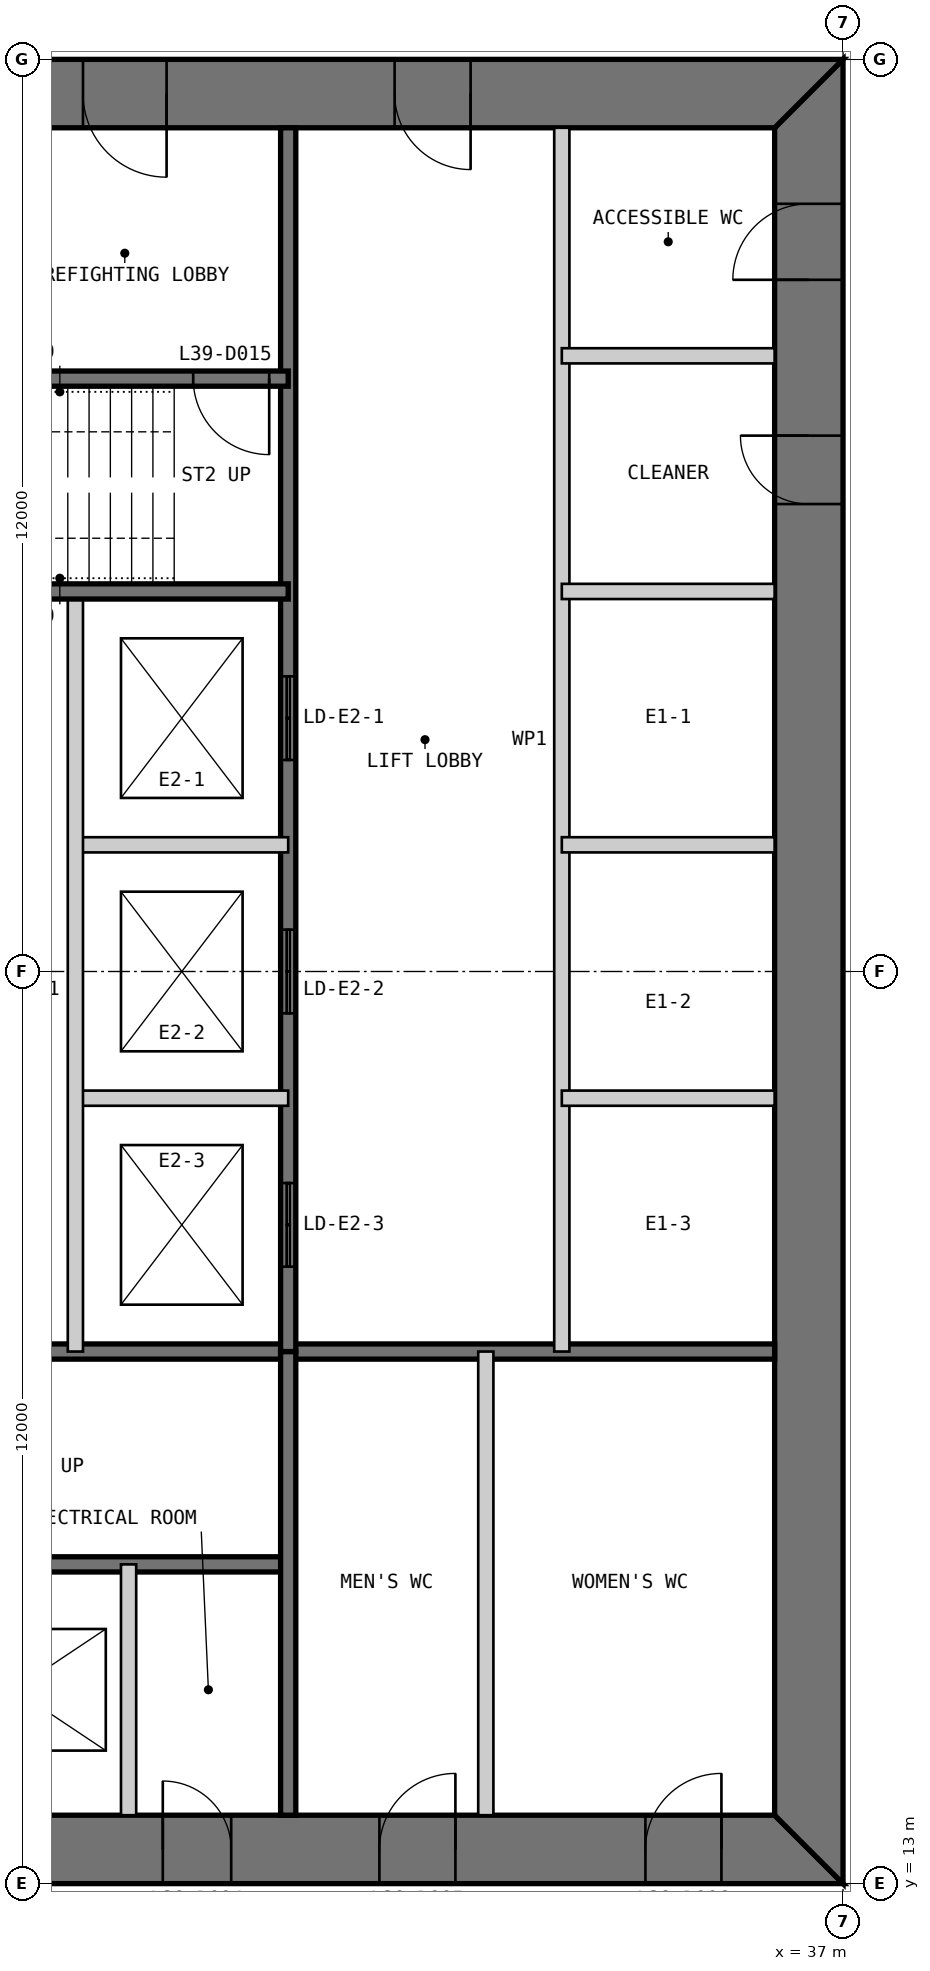
"""IFC4 building model, lengths in metres.
Left out: names, types, materials, properties, quantities, classifications, styles, units other than length and angle.
Written with IfcOpenShell. Run it as: python <this file> out.ifc"""

import sys

from ifc_helpers import new_model, si_unit, direction, frame, frame_2d, origin, place, context, subcontext, project, spatial, polyline, rectangle, outline, extrude, element, fill, save


model = new_model("IFC4")
c1 = context("Model", 3, precision=1e-05, world=origin(), true_north=direction((0.0, 1.0)))
c2 = subcontext(c1, "Body", "Model", "MODEL_VIEW")
j1 = project(units=[si_unit("LENGTHUNIT", "METRE"), si_unit("PLANEANGLEUNIT", "RADIAN")], contexts=[c1])
p1 = place(None, origin())
s1 = spatial("IfcSite", under=j1, at=p1, CompositionType="ELEMENT")
p2 = place(p1, origin())
s2 = spatial("IfcBuilding", under=s1, at=p2, CompositionType="ELEMENT")
p3 = place(p2, frame((0.0, 0.0, 168.4)))
s3 = spatial("IfcBuildingStorey", under=s2, at=p3, CompositionType="ELEMENT", Elevation=168.4)
p4 = place(p3, frame((13.0, 13.45, 0.0), z_axis=(0.0, 0.0, 1.0), x_axis=(1.0, 0.0, 0.0)))
e1 = element("IfcWall", 1, at=p4, inside=s3, PredefinedType="SHEAR", context=c2, shape_type="SweptSolid", body=[
    extrude(outline(polyline([(0.0, -0.45), (24.0, -0.45), (23.1, 0.45), (0.9, 0.45), (0.0, -0.45)])), origin(), (0.0, 0.0, 1.0), 5.4),
])
p5 = place(p4, frame((4.9, 0.0, 0.0)))
e2 = element("IfcOpeningElement", 2, at=p5, cuts=e1, PredefinedType="OPENING", context=c2, shape_type="SweptSolid", body=[
    extrude(rectangle(XDim=1.0, YDim=2.2, at=frame_2d((0.5, 1.1))), frame((0.0, 0.46, 0.0), z_axis=(0.0, -1.0, 0.0), x_axis=(1.0, 0.0, 0.0)), (0.0, 0.0, 1.0), 0.92),
])
p6 = place(p4, frame((8.9, 0.0, 0.0)))
e3 = element("IfcOpeningElement", 3, at=p6, cuts=e1, PredefinedType="OPENING", context=c2, shape_type="SweptSolid", body=[
    extrude(rectangle(XDim=1.1, YDim=2.2, at=frame_2d((0.55, 1.1))), frame((0.0, 0.46, 0.0), z_axis=(0.0, -1.0, 0.0), x_axis=(1.0, 0.0, 0.0)), (0.0, 0.0, 1.0), 0.92),
])
p7 = place(p4, frame((15.05, 0.0, 0.0)))
e4 = element("IfcOpeningElement", 4, at=p7, cuts=e1, PredefinedType="OPENING", context=c2, shape_type="SweptSolid", body=[
    extrude(rectangle(XDim=0.9, YDim=2.2, at=frame_2d((0.45, 1.1))), frame((0.0, 0.46, 0.0), z_axis=(0.0, -1.0, 0.0), x_axis=(1.0, 0.0, 0.0)), (0.0, 0.0, 1.0), 0.92),
])
p8 = place(p4, frame((17.9, 0.0, 0.0)))
e5 = element("IfcOpeningElement", 5, at=p8, cuts=e1, PredefinedType="OPENING", context=c2, shape_type="SweptSolid", body=[
    extrude(rectangle(XDim=1.0, YDim=2.2, at=frame_2d((0.5, 1.1))), frame((0.0, 0.46, 0.0), z_axis=(0.0, -1.0, 0.0), x_axis=(1.0, 0.0, 0.0)), (0.0, 0.0, 1.0), 0.92),
])
p9 = place(p4, frame((21.4, 0.0, 0.0)))
e6 = element("IfcOpeningElement", 6, at=p9, cuts=e1, PredefinedType="OPENING", context=c2, shape_type="SweptSolid", body=[
    extrude(rectangle(XDim=1.0, YDim=2.2, at=frame_2d((0.5, 1.1))), frame((0.0, 0.46, 0.0), z_axis=(0.0, -1.0, 0.0), x_axis=(1.0, 0.0, 0.0)), (0.0, 0.0, 1.0), 0.92),
])
p10 = place(p3, frame((36.55, 13.9, 0.0), z_axis=(0.0, 0.0, 1.0), x_axis=(0.0, 1.0, 0.0)))
e7 = element("IfcWall", 7, at=p10, inside=s3, PredefinedType="SHEAR", context=c2, shape_type="SweptSolid", body=[
    extrude(outline(polyline([(-0.9, -0.45), (23.1, -0.45), (22.2, 0.45), (0.0, 0.45), (-0.9, -0.45)])), origin(), (0.0, 0.0, 1.0), 5.4),
])
p11 = place(p10, frame((20.2, 0.0, 0.0)))
e8 = element("IfcOpeningElement", 8, at=p11, cuts=e7, PredefinedType="OPENING", context=c2, shape_type="SweptSolid", body=[
    extrude(rectangle(XDim=1.0, YDim=2.2, at=frame_2d((0.5, 1.1))), frame((0.0, 0.46, 0.0), z_axis=(0.0, -1.0, 0.0), x_axis=(1.0, 0.0, 0.0)), (0.0, 0.0, 1.0), 0.92),
])
p12 = place(p10, frame((17.25, 0.0, 0.0)))
e9 = element("IfcOpeningElement", 9, at=p12, cuts=e7, PredefinedType="OPENING", context=c2, shape_type="SweptSolid", body=[
    extrude(rectangle(XDim=0.9, YDim=2.2, at=frame_2d((0.45, 1.1))), frame((0.0, 0.46, 0.0), z_axis=(0.0, -1.0, 0.0), x_axis=(1.0, 0.0, 0.0)), (0.0, 0.0, 1.0), 0.92),
])
p13 = place(p3, frame((37.0, 36.55, 0.0), z_axis=(0.0, 0.0, 1.0), x_axis=(-1.0, 0.0, 0.0)))
e10 = element("IfcWall", 10, at=p13, inside=s3, PredefinedType="SHEAR", context=c2, shape_type="SweptSolid", body=[
    extrude(outline(polyline([(0.0, -0.45), (24.0, -0.45), (23.1, 0.45), (0.9, 0.45), (0.0, -0.45)])), origin(), (0.0, 0.0, 1.0), 5.4),
])
p14 = place(p13, frame((4.9, 0.0, 0.0)))
e11 = element("IfcOpeningElement", 11, at=p14, cuts=e10, PredefinedType="OPENING", context=c2, shape_type="SweptSolid", body=[
    extrude(rectangle(XDim=1.0, YDim=2.2, at=frame_2d((0.5, 1.1))), frame((0.0, 0.46, 0.0), z_axis=(0.0, -1.0, 0.0), x_axis=(1.0, 0.0, 0.0)), (0.0, 0.0, 1.0), 0.92),
])
p15 = place(p13, frame((8.9, 0.0, 0.0)))
e12 = element("IfcOpeningElement", 12, at=p15, cuts=e10, PredefinedType="OPENING", context=c2, shape_type="SweptSolid", body=[
    extrude(rectangle(XDim=1.1, YDim=2.2, at=frame_2d((0.55, 1.1))), frame((0.0, 0.46, 0.0), z_axis=(0.0, -1.0, 0.0), x_axis=(1.0, 0.0, 0.0)), (0.0, 0.0, 1.0), 0.92),
])
p16 = place(p13, frame((15.05, 0.0, 0.0)))
e13 = element("IfcOpeningElement", 13, at=p16, cuts=e10, PredefinedType="OPENING", context=c2, shape_type="SweptSolid", body=[
    extrude(rectangle(XDim=0.9, YDim=2.2, at=frame_2d((0.45, 1.1))), frame((0.0, 0.46, 0.0), z_axis=(0.0, -1.0, 0.0), x_axis=(1.0, 0.0, 0.0)), (0.0, 0.0, 1.0), 0.92),
])
p17 = place(p13, frame((17.9, 0.0, 0.0)))
e14 = element("IfcOpeningElement", 14, at=p17, cuts=e10, PredefinedType="OPENING", context=c2, shape_type="SweptSolid", body=[
    extrude(rectangle(XDim=1.0, YDim=2.2, at=frame_2d((0.5, 1.1))), frame((0.0, 0.46, 0.0), z_axis=(0.0, -1.0, 0.0), x_axis=(1.0, 0.0, 0.0)), (0.0, 0.0, 1.0), 0.92),
])
p18 = place(p13, frame((21.4, 0.0, 0.0)))
e15 = element("IfcOpeningElement", 15, at=p18, cuts=e10, PredefinedType="OPENING", context=c2, shape_type="SweptSolid", body=[
    extrude(rectangle(XDim=1.0, YDim=2.2, at=frame_2d((0.5, 1.1))), frame((0.0, 0.46, 0.0), z_axis=(0.0, -1.0, 0.0), x_axis=(1.0, 0.0, 0.0)), (0.0, 0.0, 1.0), 0.92),
])
p19 = place(p3, frame((20.3, 17.2, 0.0), z_axis=(0.0, 0.0, 1.0), x_axis=(1.0, 0.0, 0.0)))
e16 = element("IfcWall", 16, at=p19, inside=s3, PredefinedType="SOLIDWALL", context=c2, shape_type="SweptSolid", body=[
    extrude(rectangle(XDim=9.4, YDim=0.2, at=frame_2d((4.7, 0.0))), origin(), (0.0, 0.0, 1.0), 5.2),
])
p20 = place(p19, frame((0.25, 0.0, 0.0)))
e17 = element("IfcOpeningElement", 17, at=p20, cuts=e16, PredefinedType="OPENING", context=c2, shape_type="SweptSolid", body=[
    extrude(rectangle(XDim=1.0, YDim=2.2, at=frame_2d((0.5, 1.1))), frame((0.0, 0.11, 0.0), z_axis=(0.0, -1.0, 0.0), x_axis=(1.0, 0.0, 0.0)), (0.0, 0.0, 1.0), 0.22),
])
p21 = place(p3, frame((20.3, 20.0, 0.0), z_axis=(0.0, 0.0, 1.0), x_axis=(1.0, 0.0, 0.0)))
e18 = element("IfcWall", 18, at=p21, inside=s3, PredefinedType="SOLIDWALL", context=c2, shape_type="SweptSolid", body=[
    extrude(rectangle(XDim=15.8, YDim=0.2, at=frame_2d((7.9, 0.0))), origin(), (0.0, 0.0, 1.0), 5.2),
])
p22 = place(p3, frame((27.6, 13.9, 0.0), z_axis=(0.0, 0.0, 1.0), x_axis=(0.0, 1.0, 0.0)))
e19 = element("IfcWall", 19, at=p22, inside=s3, PredefinedType="PARTITIONING", context=c2, shape_type="SweptSolid", body=[
    extrude(rectangle(XDim=3.3, YDim=0.2, at=frame_2d((1.65, 0.0))), origin(), (0.0, 0.0, 1.0), 5.2),
])
p23 = place(p3, frame((29.7, 13.9, 0.0), z_axis=(0.0, 0.0, 1.0), x_axis=(0.0, 1.0, 0.0)))
e20 = element("IfcWall", 20, at=p23, inside=s3, PredefinedType="SOLIDWALL", context=c2, shape_type="SweptSolid", body=[
    extrude(rectangle(XDim=6.1, YDim=0.2, at=frame_2d((3.05, 0.0))), origin(), (0.0, 0.0, 1.0), 5.2),
])
p24 = place(p3, frame((32.3, 13.9, 0.0), z_axis=(0.0, 0.0, 1.0), x_axis=(0.0, 1.0, 0.0)))
e21 = element("IfcWall", 21, at=p24, inside=s3, PredefinedType="PARTITIONING", context=c2, shape_type="SweptSolid", body=[
    extrude(rectangle(XDim=6.1, YDim=0.2, at=frame_2d((3.05, 0.0))), origin(), (0.0, 0.0, 1.0), 5.2),
])
p25 = place(p3, frame((33.3, 36.1, 0.0), z_axis=(0.0, 0.0, 1.0), x_axis=(0.0, -1.0, 0.0)))
e22 = element("IfcWall", 22, at=p25, inside=s3, PredefinedType="PARTITIONING", context=c2, shape_type="SweptSolid", body=[
    extrude(rectangle(XDim=16.1, YDim=0.2, at=frame_2d((8.05, 0.0))), origin(), (0.0, 0.0, 1.0), 5.2),
])
p26 = place(p3, frame((29.7, 36.1, 0.0), z_axis=(0.0, 0.0, 1.0), x_axis=(0.0, -1.0, 0.0)))
e23 = element("IfcWall", 23, at=p26, inside=s3, PredefinedType="SOLIDWALL", context=c2, shape_type="SweptSolid", body=[
    extrude(rectangle(XDim=16.1, YDim=0.2, at=frame_2d((8.05, 0.0))), origin(), (0.0, 0.0, 1.0), 5.2),
])
p27 = place(p26, frame((7.217, 0.0, 0.0)))
e24 = element("IfcOpeningElement", 24, at=p27, cuts=e23, PredefinedType="OPENING", context=c2, shape_type="SweptSolid", body=[
    extrude(rectangle(XDim=1.1, YDim=2.2, at=frame_2d((0.55, 1.1))), frame((0.0, 0.11, 0.0), z_axis=(0.0, -1.0, 0.0), x_axis=(1.0, 0.0, 0.0)), (0.0, 0.0, 1.0), 0.22),
])
p28 = place(p26, frame((10.55, 0.0, 0.0)))
e25 = element("IfcOpeningElement", 25, at=p28, cuts=e23, PredefinedType="OPENING", context=c2, shape_type="SweptSolid", body=[
    extrude(rectangle(XDim=1.1, YDim=2.2, at=frame_2d((0.55, 1.1))), frame((0.0, 0.11, 0.0), z_axis=(0.0, -1.0, 0.0), x_axis=(1.0, 0.0, 0.0)), (0.0, 0.0, 1.0), 0.22),
])
p29 = place(p26, frame((13.883, 0.0, 0.0)))
e26 = element("IfcOpeningElement", 26, at=p29, cuts=e23, PredefinedType="OPENING", context=c2, shape_type="SweptSolid", body=[
    extrude(rectangle(XDim=1.1, YDim=2.2, at=frame_2d((0.55, 1.1))), frame((0.0, 0.11, 0.0), z_axis=(0.0, -1.0, 0.0), x_axis=(1.0, 0.0, 0.0)), (0.0, 0.0, 1.0), 0.22),
])
for number, where, z_axis, x_axis in (
    (27, (36.1, 30.0, 0.0), (0.0, 0.0, 1.0), (-1.0, 0.0, 0.0)),
    (28, (36.1, 26.667, 0.0), (0.0, 0.0, 1.0), (-1.0, 0.0, 0.0)),
    (29, (36.1, 23.333, 0.0), (0.0, 0.0, 1.0), (-1.0, 0.0, 0.0)),
    (30, (29.7, 26.667, 0.0), (0.0, 0.0, 1.0), (-1.0, 0.0, 0.0)),
    (31, (29.7, 23.333, 0.0), (0.0, 0.0, 1.0), (-1.0, 0.0, 0.0)),
):
    element("IfcWall", number, at=place(p3, frame(where, z_axis=z_axis, x_axis=x_axis)), inside=s3, PredefinedType="PARTITIONING", context=c2, shape_type="SweptSolid", body=[
        extrude(rectangle(XDim=2.8, YDim=0.2, at=frame_2d((1.4, 0.0))), origin(), (0.0, 0.0, 1.0), 5.2),
    ])
p30 = place(p3, frame((26.9, 30.0, 0.0), z_axis=(0.0, 0.0, 1.0), x_axis=(0.0, -1.0, 0.0)))
e32 = element("IfcWall", 32, at=p30, inside=s3, PredefinedType="PARTITIONING", context=c2, shape_type="SweptSolid", body=[
    extrude(rectangle(XDim=10.0, YDim=0.2, at=frame_2d((5.0, 0.0))), origin(), (0.0, 0.0, 1.0), 5.2),
])
p31 = place(p3, frame((29.7, 32.8, 0.0), z_axis=(0.0, 0.0, 1.0), x_axis=(-1.0, 0.0, 0.0)))
e33 = element("IfcWall", 33, at=p31, inside=s3, PredefinedType="SOLIDWALL", context=c2, shape_type="SweptSolid", body=[
    extrude(rectangle(XDim=9.4, YDim=0.2, at=frame_2d((4.7, 0.0))), origin(), (0.0, 0.0, 1.0), 5.2),
])
p32 = place(p31, frame((0.25, 0.0, 0.0)))
e34 = element("IfcOpeningElement", 34, at=p32, cuts=e33, PredefinedType="OPENING", context=c2, shape_type="SweptSolid", body=[
    extrude(rectangle(XDim=1.0, YDim=2.2, at=frame_2d((0.5, 1.1))), frame((0.0, 0.11, 0.0), z_axis=(0.0, -1.0, 0.0), x_axis=(1.0, 0.0, 0.0)), (0.0, 0.0, 1.0), 0.22),
])
p33 = place(p3, frame((29.7, 30.0, 0.0), z_axis=(0.0, 0.0, 1.0), x_axis=(-1.0, 0.0, 0.0)))
e35 = element("IfcWall", 35, at=p33, inside=s3, PredefinedType="SOLIDWALL", context=c2, shape_type="SweptSolid", body=[
    extrude(rectangle(XDim=15.8, YDim=0.2, at=frame_2d((7.9, 0.0))), origin(), (0.0, 0.0, 1.0), 5.2),
])
p34 = place(p3, frame((36.1, 33.1, 0.0), z_axis=(0.0, 0.0, 1.0), x_axis=(-1.0, 0.0, 0.0)))
e36 = element("IfcWall", 36, at=p34, inside=s3, PredefinedType="PARTITIONING", context=c2, shape_type="SweptSolid", body=[
    extrude(rectangle(XDim=2.8, YDim=0.2, at=frame_2d((1.4, 0.0))), origin(), (0.0, 0.0, 1.0), 5.2),
])
p35 = place(p7, origin())
e37 = element("IfcDoor", 37, at=p35, inside=s3, OperationType="SINGLE_SWING_LEFT", PredefinedType="DOOR", context=c2, shape_type="SweptSolid", body=[
    extrude(rectangle(XDim=0.9, YDim=2.2, at=frame_2d((0.45, 1.1))), frame((0.0, 0.025, 0.0), z_axis=(0.0, -1.0, 0.0), x_axis=(1.0, 0.0, 0.0)), (0.0, 0.0, 1.0), 0.05),
    extrude(outline(polyline([(0.0, 0.0), (0.04, 0.0), (0.04, 2.16), (0.86, 2.16), (0.86, 0.0), (0.9, 0.0), (0.9, 2.2), (0.0, 2.2), (0.0, 0.0)])), frame((0.0, 0.3, 0.0), z_axis=(0.0, -1.0, 0.0), x_axis=(1.0, 0.0, 0.0)), (0.0, 0.0, 1.0), 0.6),
])
fill(e4, e37)
p36 = place(p8, origin())
e38 = element("IfcDoor", 38, at=p36, inside=s3, OperationType="SINGLE_SWING_RIGHT", PredefinedType="DOOR", context=c2, shape_type="SweptSolid", body=[
    extrude(rectangle(XDim=1.0, YDim=2.2, at=frame_2d((0.5, 1.1))), frame((0.0, 0.025, 0.0), z_axis=(0.0, -1.0, 0.0), x_axis=(1.0, 0.0, 0.0)), (0.0, 0.0, 1.0), 0.05),
    extrude(outline(polyline([(0.0, 0.0), (0.04, 0.0), (0.04, 2.16), (0.96, 2.16), (0.96, 0.0), (1.0, 0.0), (1.0, 2.2), (0.0, 2.2), (0.0, 0.0)])), frame((0.0, 0.3, 0.0), z_axis=(0.0, -1.0, 0.0), x_axis=(1.0, 0.0, 0.0)), (0.0, 0.0, 1.0), 0.6),
])
fill(e5, e38)
p37 = place(p9, origin())
e39 = element("IfcDoor", 39, at=p37, inside=s3, OperationType="SINGLE_SWING_RIGHT", PredefinedType="DOOR", context=c2, shape_type="SweptSolid", body=[
    extrude(rectangle(XDim=1.0, YDim=2.2, at=frame_2d((0.5, 1.1))), frame((0.0, 0.025, 0.0), z_axis=(0.0, -1.0, 0.0), x_axis=(1.0, 0.0, 0.0)), (0.0, 0.0, 1.0), 0.05),
    extrude(outline(polyline([(0.0, 0.0), (0.04, 0.0), (0.04, 2.16), (0.96, 2.16), (0.96, 0.0), (1.0, 0.0), (1.0, 2.2), (0.0, 2.2), (0.0, 0.0)])), frame((0.0, 0.3, 0.0), z_axis=(0.0, -1.0, 0.0), x_axis=(1.0, 0.0, 0.0)), (0.0, 0.0, 1.0), 0.6),
])
fill(e6, e39)
p38 = place(p14, origin())
e40 = element("IfcDoor", 40, at=p38, inside=s3, OperationType="SINGLE_SWING_LEFT", PredefinedType="DOOR", context=c2, shape_type="SweptSolid", body=[
    extrude(rectangle(XDim=1.0, YDim=2.2, at=frame_2d((0.5, 1.1))), frame((0.0, 0.025, 0.0), z_axis=(0.0, -1.0, 0.0), x_axis=(1.0, 0.0, 0.0)), (0.0, 0.0, 1.0), 0.05),
    extrude(outline(polyline([(0.0, 0.0), (0.04, 0.0), (0.04, 2.16), (0.96, 2.16), (0.96, 0.0), (1.0, 0.0), (1.0, 2.2), (0.0, 2.2), (0.0, 0.0)])), frame((0.0, 0.3, 0.0), z_axis=(0.0, -1.0, 0.0), x_axis=(1.0, 0.0, 0.0)), (0.0, 0.0, 1.0), 0.6),
])
fill(e11, e40)
p39 = place(p15, origin())
e41 = element("IfcDoor", 41, at=p39, inside=s3, OperationType="SINGLE_SWING_LEFT", PredefinedType="DOOR", context=c2, shape_type="SweptSolid", body=[
    extrude(rectangle(XDim=1.1, YDim=2.2, at=frame_2d((0.55, 1.1))), frame((0.0, 0.025, 0.0), z_axis=(0.0, -1.0, 0.0), x_axis=(1.0, 0.0, 0.0)), (0.0, 0.0, 1.0), 0.05),
    extrude(outline(polyline([(0.0, 0.0), (0.04, 0.0), (0.04, 2.16), (1.06, 2.16), (1.06, 0.0), (1.1, 0.0), (1.1, 2.2), (0.0, 2.2), (0.0, 0.0)])), frame((0.0, 0.3, 0.0), z_axis=(0.0, -1.0, 0.0), x_axis=(1.0, 0.0, 0.0)), (0.0, 0.0, 1.0), 0.6),
])
fill(e12, e41)
p40 = place(p32, origin())
e42 = element("IfcDoor", 42, at=p40, inside=s3, OperationType="SINGLE_SWING_LEFT", PredefinedType="DOOR", context=c2, shape_type="SweptSolid", body=[
    extrude(rectangle(XDim=1.0, YDim=2.2, at=frame_2d((0.5, 1.1))), frame((0.0, 0.025, 0.0), z_axis=(0.0, -1.0, 0.0), x_axis=(1.0, 0.0, 0.0)), (0.0, 0.0, 1.0), 0.05),
])
fill(e34, e42)
p41 = place(p11, origin())
e43 = element("IfcDoor", 43, at=p41, inside=s3, OperationType="SINGLE_SWING_LEFT", PredefinedType="DOOR", context=c2, shape_type="SweptSolid", body=[
    extrude(rectangle(XDim=1.0, YDim=2.2, at=frame_2d((0.5, 1.1))), frame((0.0, 0.025, 0.0), z_axis=(0.0, -1.0, 0.0), x_axis=(1.0, 0.0, 0.0)), (0.0, 0.0, 1.0), 0.05),
    extrude(outline(polyline([(0.0, 0.0), (0.04, 0.0), (0.04, 2.16), (0.96, 2.16), (0.96, 0.0), (1.0, 0.0), (1.0, 2.2), (0.0, 2.2), (0.0, 0.0)])), frame((0.0, 0.3, 0.0), z_axis=(0.0, -1.0, 0.0), x_axis=(1.0, 0.0, 0.0)), (0.0, 0.0, 1.0), 0.6),
])
fill(e8, e43)
p42 = place(p12, origin())
e44 = element("IfcDoor", 44, at=p42, inside=s3, OperationType="SINGLE_SWING_RIGHT", PredefinedType="DOOR", context=c2, shape_type="SweptSolid", body=[
    extrude(rectangle(XDim=0.9, YDim=2.2, at=frame_2d((0.45, 1.1))), frame((0.0, 0.025, 0.0), z_axis=(0.0, -1.0, 0.0), x_axis=(1.0, 0.0, 0.0)), (0.0, 0.0, 1.0), 0.05),
    extrude(outline(polyline([(0.0, 0.0), (0.04, 0.0), (0.04, 2.16), (0.86, 2.16), (0.86, 0.0), (0.9, 0.0), (0.9, 2.2), (0.0, 2.2), (0.0, 0.0)])), frame((0.0, 0.3, 0.0), z_axis=(0.0, -1.0, 0.0), x_axis=(1.0, 0.0, 0.0)), (0.0, 0.0, 1.0), 0.6),
])
fill(e9, e44)
p43 = place(p27, origin())
e45 = element("IfcDoor", 45, at=p43, inside=s3, OperationType="DOUBLE_DOOR_SLIDING", PredefinedType="DOOR", context=c2, shape_type="SweptSolid", body=[
    extrude(rectangle(XDim=1.1, YDim=2.2, at=frame_2d((0.55, 1.1))), frame((0.0, 0.025, 0.0), z_axis=(0.0, -1.0, 0.0), x_axis=(1.0, 0.0, 0.0)), (0.0, 0.0, 1.0), 0.05),
])
fill(e24, e45)
p44 = place(p28, origin())
e46 = element("IfcDoor", 46, at=p44, inside=s3, OperationType="DOUBLE_DOOR_SLIDING", PredefinedType="DOOR", context=c2, shape_type="SweptSolid", body=[
    extrude(rectangle(XDim=1.1, YDim=2.2, at=frame_2d((0.55, 1.1))), frame((0.0, 0.025, 0.0), z_axis=(0.0, -1.0, 0.0), x_axis=(1.0, 0.0, 0.0)), (0.0, 0.0, 1.0), 0.05),
])
fill(e25, e46)
p45 = place(p29, origin())
e47 = element("IfcDoor", 47, at=p45, inside=s3, OperationType="DOUBLE_DOOR_SLIDING", PredefinedType="DOOR", context=c2, shape_type="SweptSolid", body=[
    extrude(rectangle(XDim=1.1, YDim=2.2, at=frame_2d((0.55, 1.1))), frame((0.0, 0.025, 0.0), z_axis=(0.0, -1.0, 0.0), x_axis=(1.0, 0.0, 0.0)), (0.0, 0.0, 1.0), 0.05),
])
fill(e26, e47)
save(model, sys.argv[1])
